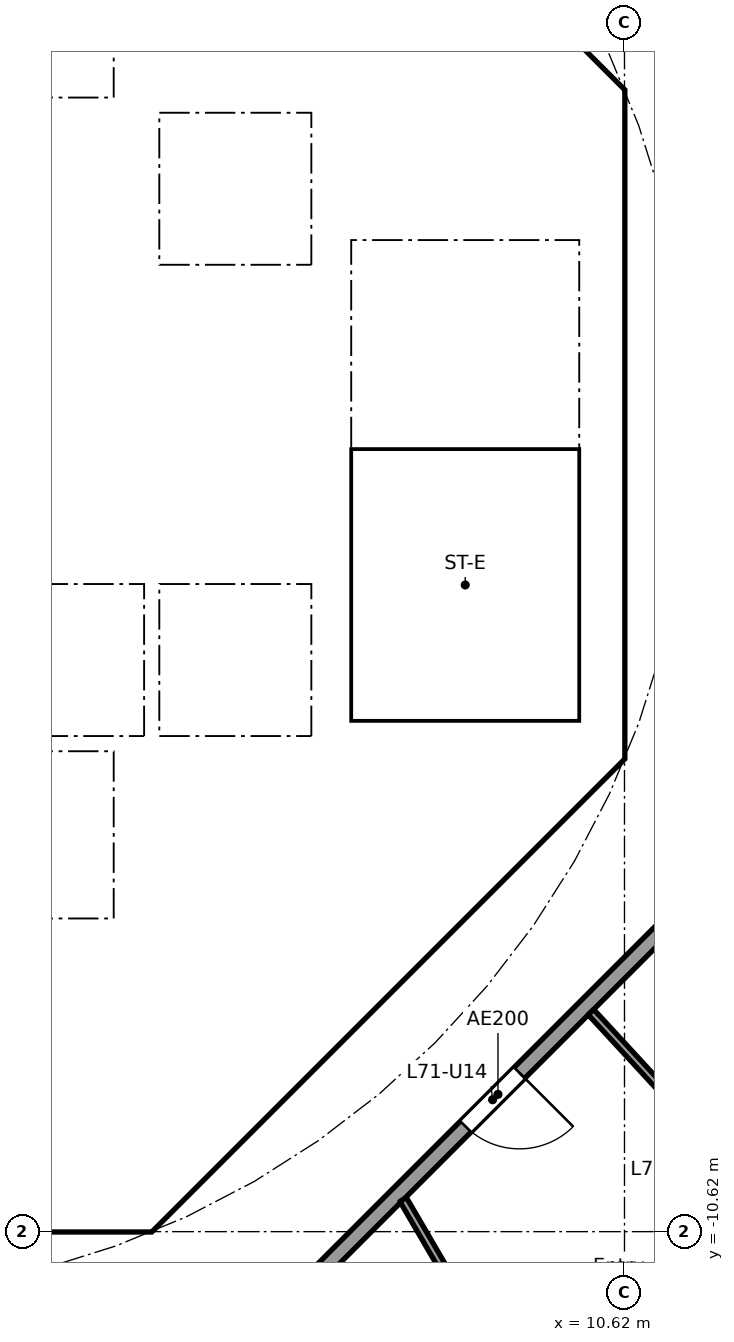
"""IFC4 building model, lengths in metres.
Left out: names, types, materials, properties, quantities, classifications, styles, units other than length and angle.
Written with IfcOpenShell. Run it as: python <this file> out.ifc"""

import sys

from ifc_helpers import new_model, si_unit, direction, frame, frame_2d, origin, place, context, subcontext, project, spatial, polyline, rectangle, outline, extrude, element, fill, save


model = new_model("IFC4")
c1 = context("Model", 3, precision=1e-05, world=origin(), true_north=direction((0.0, 1.0)))
c2 = subcontext(c1, "Body", "Model", "MODEL_VIEW")
j1 = project(units=[si_unit("LENGTHUNIT", "METRE"), si_unit("PLANEANGLEUNIT", "RADIAN")], contexts=[c1])
p1 = place(None, origin())
s1 = spatial("IfcSite", under=j1, at=p1, CompositionType="ELEMENT")
p2 = place(p1, origin())
s2 = spatial("IfcBuilding", under=s1, at=p2, CompositionType="ELEMENT")
p3 = place(p2, frame((0.0, 0.0, 280.7)))
s3 = spatial("IfcBuildingStorey", under=s2, at=p3, CompositionType="ELEMENT", Elevation=280.7)
p4 = place(p3, frame((9.988, 4.613, 0.0), z_axis=(0.0, 0.0, 1.0), x_axis=(-0.707106781187, 0.707106781187, 0.0)))
e1 = element("IfcWall", 1, at=p4, inside=s3, PredefinedType="SHEAR", context=c2, shape_type="SweptSolid", body=[
    extrude(rectangle(XDim=7.602, YDim=0.6, at=frame_2d((3.801, 0.0))), origin(), (0.0, 0.0, 1.0), 3.44),
])
p5 = place(p4, frame((3.201, 0.0, 0.0)))
e2 = element("IfcOpeningElement", 2, at=p5, cuts=e1, PredefinedType="OPENING", context=c2, shape_type="SweptSolid", body=[
    extrude(rectangle(XDim=1.2, YDim=2.1, at=frame_2d((0.6, 1.05))), frame((0.0, 0.31, 0.0), z_axis=(0.0, -1.0, 0.0), x_axis=(1.0, 0.0, 0.0)), (0.0, 0.0, 1.0), 0.62),
])
p6 = place(p3, frame((4.613, -9.988, 0.0), z_axis=(0.0, 0.0, 1.0), x_axis=(0.707106781187, 0.707106781187, 0.0)))
e3 = element("IfcWall", 3, at=p6, inside=s3, PredefinedType="SHEAR", context=c2, shape_type="SweptSolid", body=[
    extrude(rectangle(XDim=7.602, YDim=0.6, at=frame_2d((3.801, 0.0))), origin(), (0.0, 0.0, 1.0), 3.44),
])
p7 = place(p6, frame((3.201, 0.0, 0.0)))
e4 = element("IfcOpeningElement", 4, at=p7, cuts=e3, PredefinedType="OPENING", context=c2, shape_type="SweptSolid", body=[
    extrude(rectangle(XDim=1.2, YDim=2.1, at=frame_2d((0.6, 1.05))), frame((0.0, 0.31, 0.0), z_axis=(0.0, -1.0, 0.0), x_axis=(1.0, 0.0, 0.0)), (0.0, 0.0, 1.0), 0.62),
])
p8 = place(p3, frame((4.0, 4.3, 0.0), z_axis=(0.0, 0.0, 1.0), x_axis=(0.0, 1.0, 0.0)))
e5 = element("IfcWall", 5, at=p8, inside=s3, PredefinedType="SOLIDWALL", context=c2, shape_type="SweptSolid", body=[
    extrude(rectangle(XDim=2.2, YDim=0.2, at=frame_2d((1.1, 0.0))), origin(), (0.0, 0.0, 1.0), 3.44),
])
p9 = place(p8, frame((0.55, 0.0, 0.0)))
e6 = element("IfcOpeningElement", 6, at=p9, cuts=e5, PredefinedType="OPENING", context=c2, shape_type="SweptSolid", body=[
    extrude(rectangle(XDim=1.1, YDim=2.1, at=frame_2d((0.55, 1.05))), frame((0.0, 0.11, 0.0), z_axis=(0.0, -1.0, 0.0), x_axis=(1.0, 0.0, 0.0)), (0.0, 0.0, 1.0), 0.22),
])
p10 = place(p3, frame((-6.7, 2.0, 0.0), z_axis=(0.0, 0.0, 1.0), x_axis=(1.0, 0.0, 0.0)))
e7 = element("IfcWall", 7, at=p10, inside=s3, PredefinedType="SOLIDWALL", context=c2, shape_type="SweptSolid", body=[
    extrude(rectangle(XDim=13.4, YDim=0.2, at=frame_2d((6.7, 0.0))), origin(), (0.0, 0.0, 1.0), 3.44),
])
p11 = place(p10, frame((11.65, 0.0, 0.0)))
e8 = element("IfcOpeningElement", 8, at=p11, cuts=e7, PredefinedType="OPENING", context=c2, shape_type="SweptSolid", body=[
    extrude(rectangle(XDim=1.1, YDim=2.1, at=frame_2d((0.55, 1.05))), frame((0.0, 0.11, 0.0), z_axis=(0.0, -1.0, 0.0), x_axis=(1.0, 0.0, 0.0)), (0.0, 0.0, 1.0), 0.22),
])
p12 = place(p10, frame((1.85, 0.0, 0.0)))
e9 = element("IfcOpeningElement", 9, at=p12, cuts=e7, PredefinedType="OPENING", context=c2, shape_type="SweptSolid", body=[
    extrude(rectangle(XDim=0.9, YDim=2.1, at=frame_2d((0.45, 1.05))), frame((0.0, 0.11, 0.0), z_axis=(0.0, -1.0, 0.0), x_axis=(1.0, 0.0, 0.0)), (0.0, 0.0, 1.0), 0.22),
])
p13 = place(p10, frame((5.15, 0.0, 0.0)))
e10 = element("IfcOpeningElement", 10, at=p13, cuts=e7, PredefinedType="OPENING", context=c2, shape_type="SweptSolid", body=[
    extrude(rectangle(XDim=0.9, YDim=2.1, at=frame_2d((0.45, 1.05))), frame((0.0, 0.11, 0.0), z_axis=(0.0, -1.0, 0.0), x_axis=(1.0, 0.0, 0.0)), (0.0, 0.0, 1.0), 0.22),
])
p14 = place(p10, frame((8.45, 0.0, 0.0)))
e11 = element("IfcOpeningElement", 11, at=p14, cuts=e7, PredefinedType="OPENING", context=c2, shape_type="SweptSolid", body=[
    extrude(rectangle(XDim=0.9, YDim=2.1, at=frame_2d((0.45, 1.05))), frame((0.0, 0.11, 0.0), z_axis=(0.0, -1.0, 0.0), x_axis=(1.0, 0.0, 0.0)), (0.0, 0.0, 1.0), 0.22),
])
p15 = place(p3, frame((6.7, 4.0, 0.0), z_axis=(0.0, 0.0, 1.0), x_axis=(1.0, 0.0, 0.0)))
e12 = element("IfcWall", 12, at=p15, inside=s3, PredefinedType="SOLIDWALL", context=c2, shape_type="SweptSolid", body=[
    extrude(rectangle(XDim=3.325, YDim=0.2, at=frame_2d((1.662, 0.0))), origin(), (0.0, 0.0, 1.0), 3.44),
])
p16 = place(p15, frame((1.25, 0.0, 0.0)))
e13 = element("IfcOpeningElement", 13, at=p16, cuts=e12, PredefinedType="OPENING", context=c2, shape_type="SweptSolid", body=[
    extrude(rectangle(XDim=1.1, YDim=2.1, at=frame_2d((0.55, 1.05))), frame((0.0, 0.11, 0.0), z_axis=(0.0, -1.0, 0.0), x_axis=(1.0, 0.0, 0.0)), (0.0, 0.0, 1.0), 0.22),
])
p17 = place(p3, frame((4.0, -10.025, 0.0), z_axis=(0.0, 0.0, 1.0), x_axis=(0.0, 1.0, 0.0)))
e14 = element("IfcWall", 14, at=p17, inside=s3, PredefinedType="SOLIDWALL", context=c2, shape_type="SweptSolid", body=[
    extrude(rectangle(XDim=3.0, YDim=0.2, at=frame_2d((1.5, 0.0))), origin(), (0.0, 0.0, 1.0), 3.44),
])
p18 = place(p17, frame((0.975, 0.0, 0.0)))
e15 = element("IfcOpeningElement", 15, at=p18, cuts=e14, PredefinedType="OPENING", context=c2, shape_type="SweptSolid", body=[
    extrude(rectangle(XDim=1.1, YDim=2.1, at=frame_2d((0.55, 1.05))), frame((0.0, 0.11, 0.0), z_axis=(0.0, -1.0, 0.0), x_axis=(1.0, 0.0, 0.0)), (0.0, 0.0, 1.0), 0.22),
])
p19 = place(p3, frame((4.0, -6.5, 0.0), z_axis=(0.0, 0.0, 1.0), x_axis=(0.0, 1.0, 0.0)))
e16 = element("IfcWall", 16, at=p19, inside=s3, PredefinedType="SOLIDWALL", context=c2, shape_type="SweptSolid", body=[
    extrude(rectangle(XDim=2.2, YDim=0.2, at=frame_2d((1.1, 0.0))), origin(), (0.0, 0.0, 1.0), 3.44),
])
p20 = place(p19, frame((0.55, 0.0, 0.0)))
e17 = element("IfcOpeningElement", 17, at=p20, cuts=e16, PredefinedType="OPENING", context=c2, shape_type="SweptSolid", body=[
    extrude(rectangle(XDim=1.1, YDim=2.1, at=frame_2d((0.55, 1.05))), frame((0.0, 0.11, 0.0), z_axis=(0.0, -1.0, 0.0), x_axis=(1.0, 0.0, 0.0)), (0.0, 0.0, 1.0), 0.22),
])
p21 = place(p3, frame((-6.7, -2.0, 0.0), z_axis=(0.0, 0.0, 1.0), x_axis=(1.0, 0.0, 0.0)))
e18 = element("IfcWall", 18, at=p21, inside=s3, PredefinedType="SOLIDWALL", context=c2, shape_type="SweptSolid", body=[
    extrude(rectangle(XDim=13.4, YDim=0.2, at=frame_2d((6.7, 0.0))), origin(), (0.0, 0.0, 1.0), 3.44),
])
p22 = place(p21, frame((9.45, 0.0, 0.0)))
e19 = element("IfcOpeningElement", 19, at=p22, cuts=e18, PredefinedType="OPENING", context=c2, shape_type="SweptSolid", body=[
    extrude(rectangle(XDim=1.1, YDim=2.1, at=frame_2d((0.55, 1.05))), frame((0.0, 0.11, 0.0), z_axis=(0.0, -1.0, 0.0), x_axis=(1.0, 0.0, 0.0)), (0.0, 0.0, 1.0), 0.22),
])
p23 = place(p21, frame((11.65, 0.0, 0.0)))
e20 = element("IfcOpeningElement", 20, at=p23, cuts=e18, PredefinedType="OPENING", context=c2, shape_type="SweptSolid", body=[
    extrude(rectangle(XDim=1.1, YDim=2.1, at=frame_2d((0.55, 1.05))), frame((0.0, 0.11, 0.0), z_axis=(0.0, -1.0, 0.0), x_axis=(1.0, 0.0, 0.0)), (0.0, 0.0, 1.0), 0.22),
])
p24 = place(p21, frame((1.85, 0.0, 0.0)))
e21 = element("IfcOpeningElement", 21, at=p24, cuts=e18, PredefinedType="OPENING", context=c2, shape_type="SweptSolid", body=[
    extrude(rectangle(XDim=0.9, YDim=2.1, at=frame_2d((0.45, 1.05))), frame((0.0, 0.11, 0.0), z_axis=(0.0, -1.0, 0.0), x_axis=(1.0, 0.0, 0.0)), (0.0, 0.0, 1.0), 0.22),
])
p25 = place(p21, frame((5.15, 0.0, 0.0)))
e22 = element("IfcOpeningElement", 22, at=p25, cuts=e18, PredefinedType="OPENING", context=c2, shape_type="SweptSolid", body=[
    extrude(rectangle(XDim=0.9, YDim=2.1, at=frame_2d((0.45, 1.05))), frame((0.0, 0.11, 0.0), z_axis=(0.0, -1.0, 0.0), x_axis=(1.0, 0.0, 0.0)), (0.0, 0.0, 1.0), 0.22),
])
p26 = place(p21, frame((7.35, 0.0, 0.0)))
e23 = element("IfcOpeningElement", 23, at=p26, cuts=e18, PredefinedType="OPENING", context=c2, shape_type="SweptSolid", body=[
    extrude(rectangle(XDim=0.9, YDim=2.1, at=frame_2d((0.45, 1.05))), frame((0.0, 0.11, 0.0), z_axis=(0.0, -1.0, 0.0), x_axis=(1.0, 0.0, 0.0)), (0.0, 0.0, 1.0), 0.22),
])
p27 = place(p3, origin())
e24 = element("IfcWall", 24, at=p27, inside=s3, PredefinedType="SHEAR", context=c2, shape_type="SweptSolid", body=[
    extrude(outline(polyline([(-4.152, -10.025), (4.152, -10.025), (4.401, -9.776), (4.825, -10.2), (4.401, -10.625), (-4.401, -10.625), (-4.825, -10.2), (-4.401, -9.776), (-4.152, -10.025)])), origin(), (0.0, 0.0, 1.0), 3.44),
])
p28 = place(p3, origin())
e25 = element("IfcWall", 25, at=p28, inside=s3, PredefinedType="SHEAR", context=c2, shape_type="SweptSolid", body=[
    extrude(outline(polyline([(9.776, -4.401), (10.025, -4.152), (10.025, -3.801), (10.025, 4.152), (9.776, 4.401), (10.2, 4.825), (10.625, 4.401), (10.625, -4.401), (10.2, -4.825), (9.776, -4.401)])), origin(), (0.0, 0.0, 1.0), 3.44),
])
p29 = place(p3, origin())
e26 = element("IfcWall", 26, at=p29, inside=s3, PredefinedType="SOLIDWALL", context=c2, shape_type="SweptSolid", body=[
    extrude(outline(polyline([(-6.7, 4.3), (6.7, 4.3), (6.7, 2.1), (6.5, 2.1), (6.5, 4.1), (4.5, 4.1), (4.5, 2.1), (4.3, 2.1), (4.3, 4.1), (0.1, 4.1), (0.1, 2.1), (-0.1, 2.1), (-0.1, 4.1), (-2.1, 4.1), (-2.1, 2.1), (-2.3, 2.1), (-2.3, 4.1), (-6.5, 4.1), (-6.5, 2.1), (-6.7, 2.1), (-6.7, 4.3)])), origin(), (0.0, 0.0, 1.0), 3.44),
])
p30 = place(p3, origin())
e27 = element("IfcWall", 27, at=p30, inside=s3, PredefinedType="SOLIDWALL", context=c2, shape_type="SweptSolid", body=[
    extrude(outline(polyline([(-6.7, -2.1), (-6.5, -2.1), (-6.5, -4.1), (-2.3, -4.1), (-2.3, -2.1), (-2.1, -2.1), (-2.1, -4.1), (-0.1, -4.1), (-0.1, -2.1), (0.1, -2.1), (0.1, -4.1), (2.1, -4.1), (2.1, -2.1), (2.3, -2.1), (2.3, -4.1), (4.3, -4.1), (4.3, -2.1), (4.5, -2.1), (4.5, -4.1), (6.5, -4.1), (6.5, -2.1), (6.7, -2.1), (6.7, -4.3), (-6.7, -4.3), (-6.7, -2.1)])), origin(), (0.0, 0.0, 1.0), 3.44),
])
p31 = place(p3, origin())
e28 = element("IfcWall", 28, at=p31, inside=s3, PredefinedType="SOLIDWALL", context=c2, shape_type="SweptSolid", body=[
    extrude(outline(polyline([(4.1, -7.025), (-4.1, -7.025), (-4.1, -6.5), (4.1, -6.5), (4.1, -7.025)])), origin(), (0.0, 0.0, 1.0), 3.44),
])
p32 = place(p3, origin())
e29 = element("IfcWall", 29, at=p32, inside=s3, PredefinedType="SOLIDWALL", context=c2, shape_type="SweptSolid", body=[
    extrude(outline(polyline([(7.025, -3.9), (6.7, -3.9), (6.7, 3.9), (7.025, 3.9), (7.025, -3.9)])), origin(), (0.0, 0.0, 1.0), 3.44),
])
p33 = place(p3, origin())
e30 = element("IfcWall", 30, at=p33, inside=s3, PredefinedType="SOLIDWALL", context=c2, shape_type="SweptSolid", body=[
    extrude(outline(polyline([(10.025, -4.1), (6.7, -4.1), (6.7, -3.9), (10.025, -3.9), (10.025, -4.1)])), origin(), (0.0, 0.0, 1.0), 3.44),
])
p34 = place(p3, frame((5.275, -12.494, 0.0), z_axis=(0.0, 0.0, 1.0), x_axis=(0.707106781187, 0.707106781187, 0.0)))
e31 = element("IfcWall", 31, at=p34, inside=s3, PredefinedType="PARTITIONING", context=c2, shape_type="SweptSolid", body=[
    extrude(rectangle(XDim=10.409, YDim=0.2, at=frame_2d((5.205, 0.0))), origin(), (0.0, 0.0, 1.0), 3.44),
])
p35 = place(p34, frame((4.604, 0.0, 0.0)))
e32 = element("IfcOpeningElement", 32, at=p35, cuts=e31, PredefinedType="OPENING", context=c2, shape_type="SweptSolid", body=[
    extrude(rectangle(XDim=1.0, YDim=2.1, at=frame_2d((0.5, 1.05))), frame((0.0, 0.11, 0.0), z_axis=(0.0, -1.0, 0.0), x_axis=(1.0, 0.0, 0.0)), (0.0, 0.0, 1.0), 0.22),
])
p36 = place(p3, frame((7.708, -10.198, 0.0), z_axis=(0.0, 0.0, 1.0), x_axis=(0.503839015963, -0.863797572347, 0.0)))
e33 = element("IfcWall", 33, at=p36, inside=s3, PredefinedType="PARTITIONING", context=c2, shape_type="SweptSolid", body=[
    extrude(rectangle(XDim=11.856, YDim=0.1, at=frame_2d((5.928, 0.0))), origin(), (0.0, 0.0, 1.0), 2.762),
])
p37 = place(p36, frame((2.095, 0.0, 0.0)))
e34 = element("IfcOpeningElement", 34, at=p37, cuts=e33, PredefinedType="OPENING", context=c2, shape_type="SweptSolid", body=[
    extrude(rectangle(XDim=0.9, YDim=2.1, at=frame_2d((0.45, 1.05))), frame((0.0, 0.06, 0.0), z_axis=(0.0, -1.0, 0.0), x_axis=(1.0, 0.0, 0.0)), (0.0, 0.0, 1.0), 0.12),
])
p38 = place(p36, frame((8.023, 0.0, 0.0)))
e35 = element("IfcOpeningElement", 35, at=p38, cuts=e33, PredefinedType="OPENING", context=c2, shape_type="SweptSolid", body=[
    extrude(rectangle(XDim=0.9, YDim=2.1, at=frame_2d((0.45, 1.05))), frame((0.0, 0.06, 0.0), z_axis=(0.0, -1.0, 0.0), x_axis=(1.0, 0.0, 0.0)), (0.0, 0.0, 1.0), 0.12),
])
p39 = place(p3, frame((10.304, -14.555, 0.0), z_axis=(0.0, 0.0, 1.0), x_axis=(0.628170338674, 0.778075848237, 0.0)))
e36 = element("IfcWall", 36, at=p39, inside=s3, PredefinedType="PARTITIONING", context=c2, shape_type="SweptSolid", body=[
    extrude(rectangle(XDim=4.532, YDim=0.1, at=frame_2d((2.266, 0.0))), origin(), (0.0, 0.0, 1.0), 2.905),
])
p40 = place(p39, frame((1.816, 0.0, 0.0)))
e37 = element("IfcOpeningElement", 37, at=p40, cuts=e36, PredefinedType="OPENING", context=c2, shape_type="SweptSolid", body=[
    extrude(rectangle(XDim=0.9, YDim=2.1, at=frame_2d((0.45, 1.05))), frame((0.0, 0.06, 0.0), z_axis=(0.0, -1.0, 0.0), x_axis=(1.0, 0.0, 0.0)), (0.0, 0.0, 1.0), 0.12),
])
p41 = place(p3, frame((10.179, -7.731, 0.0), z_axis=(0.0, 0.0, 1.0), x_axis=(0.67775318564, -0.73528947997, 0.0)))
e38 = element("IfcWall", 38, at=p41, inside=s3, PredefinedType="PARTITIONING", context=c2, shape_type="SweptSolid", body=[
    extrude(rectangle(XDim=10.222, YDim=0.1, at=frame_2d((5.111, 0.0))), origin(), (0.0, 0.0, 1.0), 2.762),
])
p42 = place(p41, frame((1.766, 0.0, 0.0)))
e39 = element("IfcOpeningElement", 39, at=p42, cuts=e38, PredefinedType="OPENING", context=c2, shape_type="SweptSolid", body=[
    extrude(rectangle(XDim=0.9, YDim=2.1, at=frame_2d((0.45, 1.05))), frame((0.0, 0.06, 0.0), z_axis=(0.0, -1.0, 0.0), x_axis=(1.0, 0.0, 0.0)), (0.0, 0.0, 1.0), 0.12),
])
p43 = place(p41, frame((6.877, 0.0, 0.0)))
e40 = element("IfcOpeningElement", 40, at=p43, cuts=e38, PredefinedType="OPENING", context=c2, shape_type="SweptSolid", body=[
    extrude(rectangle(XDim=0.9, YDim=2.1, at=frame_2d((0.45, 1.05))), frame((0.0, 0.06, 0.0), z_axis=(0.0, -1.0, 0.0), x_axis=(1.0, 0.0, 0.0)), (0.0, 0.0, 1.0), 0.12),
])
p44 = place(p11, origin())
e41 = element("IfcDoor", 41, at=p44, inside=s3, OperationType="DOUBLE_DOOR_SLIDING", PredefinedType="DOOR", context=c2, shape_type="SweptSolid", body=[
    extrude(rectangle(XDim=1.1, YDim=2.1, at=frame_2d((0.55, 1.05))), frame((0.0, 0.025, 0.0), z_axis=(0.0, -1.0, 0.0), x_axis=(1.0, 0.0, 0.0)), (0.0, 0.0, 1.0), 0.05),
])
fill(e8, e41)
p45 = place(p22, origin())
e42 = element("IfcDoor", 42, at=p45, inside=s3, OperationType="DOUBLE_DOOR_SLIDING", PredefinedType="DOOR", context=c2, shape_type="SweptSolid", body=[
    extrude(rectangle(XDim=1.1, YDim=2.1, at=frame_2d((0.55, 1.05))), frame((0.0, 0.025, 0.0), z_axis=(0.0, -1.0, 0.0), x_axis=(1.0, 0.0, 0.0)), (0.0, 0.0, 1.0), 0.05),
])
fill(e19, e42)
p46 = place(p23, origin())
e43 = element("IfcDoor", 43, at=p46, inside=s3, OperationType="DOUBLE_DOOR_SLIDING", PredefinedType="DOOR", context=c2, shape_type="SweptSolid", body=[
    extrude(rectangle(XDim=1.1, YDim=2.1, at=frame_2d((0.55, 1.05))), frame((0.0, 0.025, 0.0), z_axis=(0.0, -1.0, 0.0), x_axis=(1.0, 0.0, 0.0)), (0.0, 0.0, 1.0), 0.05),
])
fill(e20, e43)
p47 = place(p9, origin())
e44 = element("IfcDoor", 44, at=p47, inside=s3, OperationType="DOUBLE_DOOR_SLIDING", PredefinedType="DOOR", context=c2, shape_type="SweptSolid", body=[
    extrude(rectangle(XDim=1.1, YDim=2.1, at=frame_2d((0.55, 1.05))), frame((0.0, 0.025, 0.0), z_axis=(0.0, -1.0, 0.0), x_axis=(1.0, 0.0, 0.0)), (0.0, 0.0, 1.0), 0.05),
])
fill(e6, e44)
p48 = place(p20, origin())
e45 = element("IfcDoor", 45, at=p48, inside=s3, OperationType="DOUBLE_DOOR_SLIDING", PredefinedType="DOOR", context=c2, shape_type="SweptSolid", body=[
    extrude(rectangle(XDim=1.1, YDim=2.1, at=frame_2d((0.55, 1.05))), frame((0.0, 0.025, 0.0), z_axis=(0.0, -1.0, 0.0), x_axis=(1.0, 0.0, 0.0)), (0.0, 0.0, 1.0), 0.05),
])
fill(e17, e45)
p49 = place(p16, frame((1.1, 0.0, 0.0), x_axis=(-1.0, 0.0, 0.0)))
e46 = element("IfcDoor", 46, at=p49, inside=s3, OperationType="SINGLE_SWING_LEFT", PredefinedType="DOOR", context=c2, shape_type="SweptSolid", body=[
    extrude(rectangle(XDim=1.1, YDim=2.1, at=frame_2d((0.55, 1.05))), frame((0.0, 0.025, 0.0), z_axis=(0.0, -1.0, 0.0), x_axis=(1.0, 0.0, 0.0)), (0.0, 0.0, 1.0), 0.05),
])
fill(e13, e46)
p50 = place(p18, origin())
e47 = element("IfcDoor", 47, at=p50, inside=s3, OperationType="SINGLE_SWING_LEFT", PredefinedType="DOOR", context=c2, shape_type="SweptSolid", body=[
    extrude(rectangle(XDim=1.1, YDim=2.1, at=frame_2d((0.55, 1.05))), frame((0.0, 0.025, 0.0), z_axis=(0.0, -1.0, 0.0), x_axis=(1.0, 0.0, 0.0)), (0.0, 0.0, 1.0), 0.05),
])
fill(e15, e47)
p51 = place(p7, origin())
e48 = element("IfcDoor", 48, at=p51, inside=s3, OperationType="SINGLE_SWING_RIGHT", PredefinedType="DOOR", context=c2, shape_type="SweptSolid", body=[
    extrude(rectangle(XDim=1.2, YDim=2.1, at=frame_2d((0.6, 1.05))), frame((0.0, 0.025, 0.0), z_axis=(0.0, -1.0, 0.0), x_axis=(1.0, 0.0, 0.0)), (0.0, 0.0, 1.0), 0.05),
])
fill(e4, e48)
p52 = place(p35, frame((1.0, 0.0, 0.0), x_axis=(-1.0, 0.0, 0.0)))
e49 = element("IfcDoor", 49, at=p52, inside=s3, OperationType="SINGLE_SWING_LEFT", PredefinedType="DOOR", context=c2, shape_type="SweptSolid", body=[
    extrude(rectangle(XDim=1.0, YDim=2.1, at=frame_2d((0.5, 1.05))), frame((0.0, 0.025, 0.0), z_axis=(0.0, -1.0, 0.0), x_axis=(1.0, 0.0, 0.0)), (0.0, 0.0, 1.0), 0.05),
])
fill(e32, e49)
save(model, sys.argv[1])
